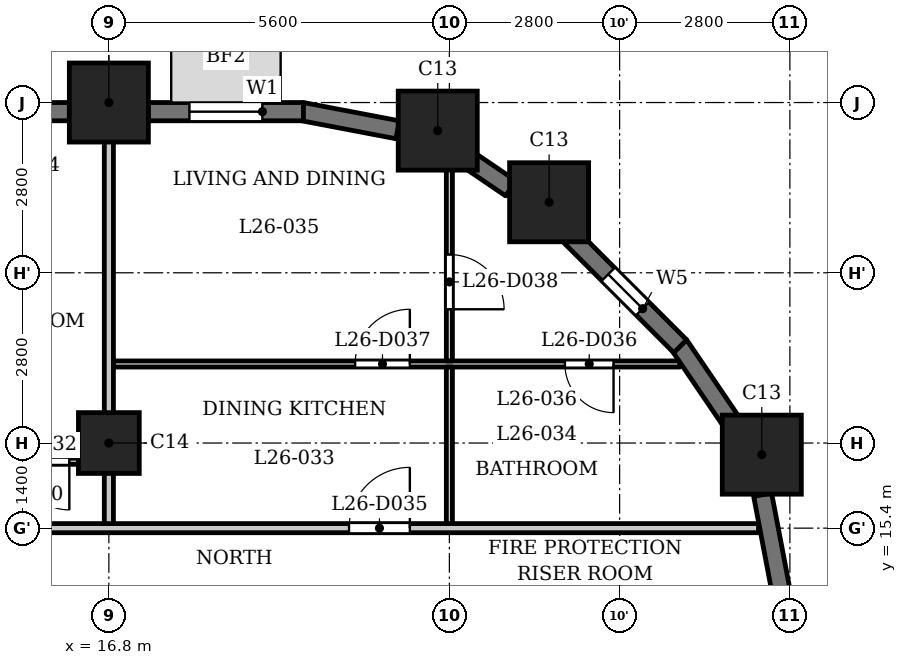
"""IFC4 building model, lengths in metres.
Left out: names, types, materials, properties, quantities, classifications, styles, units other than length and angle.
Written with IfcOpenShell. Run it as: python <this file> out.ifc"""

import sys

from ifc_helpers import new_model, si_unit, direction, frame, frame_2d, origin, origin_2d, place, context, subcontext, project, spatial, rectangle, extrude, element, fill, save


model = new_model("IFC4")
c1 = context("Model", 3, precision=1e-05, world=origin(), true_north=direction((0.0, 1.0)))
c2 = subcontext(c1, "Body", "Model", "MODEL_VIEW")
j1 = project(units=[si_unit("LENGTHUNIT", "METRE"), si_unit("PLANEANGLEUNIT", "RADIAN")], contexts=[c1])
p1 = place(None, origin())
s1 = spatial("IfcSite", under=j1, at=p1, CompositionType="ELEMENT")
p2 = place(p1, origin())
s2 = spatial("IfcBuilding", under=s1, at=p2, CompositionType="ELEMENT")
p3 = place(p2, frame((0.0, 0.0, 104.3)))
s3 = spatial("IfcBuildingStorey", under=s2, at=p3, CompositionType="ELEMENT", Elevation=104.3)
for number, where, z_axis, x_axis in (
    (1, (27.538, 16.609, 0.0), (0.0, 0.0, 1.0), (1.0, 0.0, 0.0)),
    (2, (24.04, 20.76, 0.0), (0.0, 0.0, 1.0), (1.0, 0.0, 0.0)),
    (3, (22.209, 21.938, 0.0), (0.0, 0.0, 1.0), (1.0, 0.0, 0.0)),
    (4, (16.8, 22.4, 0.0), (0.0, 0.0, 1.0), (1.0, 0.0, 0.0)),
):
    element("IfcColumn", number, at=place(p3, frame(where, z_axis=z_axis, x_axis=x_axis)), inside=s3, PredefinedType="COLUMN", context=c2, shape_type="SweptSolid", body=[
        extrude(rectangle(XDim=1.3, YDim=1.3, at=origin_2d()), origin(), (0.0, 0.0, 1.0), 3.5),
    ])
p4 = place(p3, frame((16.8, 16.8, 0.0), z_axis=(0.0, 0.0, 1.0), x_axis=(1.0, 0.0, 0.0)))
e5 = element("IfcColumn", 5, at=p4, inside=s3, PredefinedType="COLUMN", context=c2, shape_type="SweptSolid", body=[
    extrude(rectangle(XDim=1.0, YDim=1.0, at=origin_2d()), origin(), (0.0, 0.0, 1.0), 3.5),
])
for number, where, z_axis, x_axis in (
    (6, (27.853, 14.372, 0.0), (0.0, 0.0, 1.0), (-0.187, 0.982, 0.0)),
    (7, (27.082, 17.084, 0.0), (0.0, 0.0, 1.0), (-0.562, 0.827, 0.0)),
):
    element("IfcWall", number, at=place(p3, frame(where, z_axis=z_axis, x_axis=x_axis)), inside=s3, PredefinedType="SOLIDWALL", context=c2, shape_type="SweptSolid", body=[
        extrude(rectangle(XDim=1.606, YDim=0.3, at=frame_2d((0.803, 0.0))), origin(), (0.0, 0.0, 1.0), 2.4),
    ])
p5 = place(p3, frame((26.197, 18.391, 0.0), z_axis=(0.0, 0.0, 1.0), x_axis=(-0.707058908279, 0.707154650853, 0.0)))
e8 = element("IfcWall", 8, at=p5, inside=s3, PredefinedType="SOLIDWALL", context=c2, shape_type="SweptSolid", body=[
    extrude(rectangle(XDim=2.55, YDim=0.3, at=frame_2d((1.275, 0.0))), origin(), (0.0, 0.0, 1.0), 2.4),
])
p6 = place(p5, frame((0.875, 0.0, 0.6)))
e9 = element("IfcOpeningElement", 9, at=p6, cuts=e8, PredefinedType="OPENING", context=c2, shape_type="SweptSolid", body=[
    extrude(rectangle(XDim=0.8, YDim=1.55, at=frame_2d((0.4, 0.775))), frame((0.0, 0.16, 0.0), z_axis=(0.0, -1.0, 0.0), x_axis=(1.0, 0.0, 0.0)), (0.0, 0.0, 1.0), 0.32),
])
p7 = place(p3, frame((23.41, 20.989, 0.0), z_axis=(0.0, 0.0, 1.0), x_axis=(-0.827050703543, 0.562127328787, 0.0)))
e10 = element("IfcWall", 10, at=p7, inside=s3, PredefinedType="SOLIDWALL", context=c2, shape_type="SweptSolid", body=[
    extrude(rectangle(XDim=0.877, YDim=0.3, at=frame_2d((0.438, 0.0))), origin(), (0.0, 0.0, 1.0), 3.2),
])
p8 = place(p3, frame((21.55, 21.952, 0.0), z_axis=(0.0, 0.0, 1.0), x_axis=(-0.982278644094, 0.187426426519, 0.0)))
e11 = element("IfcWall", 11, at=p8, inside=s3, PredefinedType="SOLIDWALL", context=c2, shape_type="SweptSolid", body=[
    extrude(rectangle(XDim=1.606, YDim=0.3, at=frame_2d((0.803, 0.0))), origin(), (0.0, 0.0, 1.0), 2.4),
])
p9 = place(p3, frame((20.0, 22.25, 0.0), z_axis=(0.0, 0.0, 1.0), x_axis=(-1.0, 0.0, 0.0)))
e12 = element("IfcWall", 12, at=p9, inside=s3, PredefinedType="SOLIDWALL", context=c2, shape_type="SweptSolid", body=[
    extrude(rectangle(XDim=2.55, YDim=0.3, at=frame_2d((1.275, 0.0))), origin(), (0.0, 0.0, 1.0), 2.4),
])
p10 = place(p9, frame((0.675, 0.0, 0.6)))
e13 = element("IfcOpeningElement", 13, at=p10, cuts=e12, PredefinedType="OPENING", context=c2, shape_type="SweptSolid", body=[
    extrude(rectangle(XDim=1.2, YDim=1.55, at=frame_2d((0.6, 0.775))), frame((0.0, 0.16, 0.0), z_axis=(0.0, -1.0, 0.0), x_axis=(1.0, 0.0, 0.0)), (0.0, 0.0, 1.0), 0.32),
])
p11 = place(p3, frame((16.15, 22.25, 0.0), z_axis=(0.0, 0.0, 1.0), x_axis=(-1.0, 0.0, 0.0)))
e14 = element("IfcWall", 14, at=p11, inside=s3, PredefinedType="SOLIDWALL", context=c2, shape_type="SweptSolid", body=[
    extrude(rectangle(XDim=4.3, YDim=0.3, at=frame_2d((2.15, 0.0))), origin(), (0.0, 0.0, 1.0), 2.4),
])
p12 = place(p11, frame((0.337, 0.0, 0.6)))
e15 = element("IfcOpeningElement", 15, at=p12, cuts=e14, PredefinedType="OPENING", context=c2, shape_type="SweptSolid", body=[
    extrude(rectangle(XDim=1.2, YDim=1.55, at=frame_2d((0.6, 0.775))), frame((0.0, 0.16, 0.0), z_axis=(0.0, -1.0, 0.0), x_axis=(1.0, 0.0, 0.0)), (0.0, 0.0, 1.0), 0.32),
])
p13 = place(p11, frame((2.562, 0.0, 0.6)))
e16 = element("IfcOpeningElement", 16, at=p13, cuts=e14, PredefinedType="OPENING", context=c2, shape_type="SweptSolid", body=[
    extrude(rectangle(XDim=1.2, YDim=1.55, at=frame_2d((0.6, 0.775))), frame((0.0, 0.16, 0.0), z_axis=(0.0, -1.0, 0.0), x_axis=(1.0, 0.0, 0.0)), (0.0, 0.0, 1.0), 0.32),
])
p14 = place(p3, frame((14.925, 15.4, 0.0), z_axis=(0.0, 0.0, 1.0), x_axis=(1.0, 0.0, 0.0)))
e17 = element("IfcWall", 17, at=p14, inside=s3, PredefinedType="PARTITIONING", context=c2, shape_type="SweptSolid", body=[
    extrude(rectangle(XDim=12.559, YDim=0.15, at=frame_2d((6.279, 0.0))), origin(), (0.0, 0.0, 1.0), 3.2),
])
p15 = place(p14, frame((5.825, 0.0, 0.0)))
e18 = element("IfcOpeningElement", 18, at=p15, cuts=e17, PredefinedType="OPENING", context=c2, shape_type="SweptSolid", body=[
    extrude(rectangle(XDim=1.0, YDim=2.1, at=frame_2d((0.5, 1.05))), frame((0.0, 0.085, 0.0), z_axis=(0.0, -1.0, 0.0), x_axis=(1.0, 0.0, 0.0)), (0.0, 0.0, 1.0), 0.17),
])
p16 = place(p3, frame((-16.725, 16.5, 0.0), z_axis=(0.0, 0.0, 1.0), x_axis=(1.0, 0.0, 0.0)))
e19 = element("IfcWall", 19, at=p16, inside=s3, PredefinedType="PARTITIONING", context=c2, shape_type="SweptSolid", body=[
    extrude(rectangle(XDim=33.45, YDim=0.1, at=frame_2d((16.725, 0.0))), origin(), (0.0, 0.0, 1.0), 3.2),
])
p17 = place(p16, frame((1.075, 0.0, 0.0)))
e20 = element("IfcOpeningElement", 20, at=p17, cuts=e19, PredefinedType="OPENING", context=c2, shape_type="SweptSolid", body=[
    extrude(rectangle(XDim=0.8, YDim=2.1, at=frame_2d((0.4, 1.05))), frame((0.0, 0.06, 0.0), z_axis=(0.0, -1.0, 0.0), x_axis=(1.0, 0.0, 0.0)), (0.0, 0.0, 1.0), 0.12),
])
p18 = place(p16, frame((3.975, 0.0, 0.0)))
e21 = element("IfcOpeningElement", 21, at=p18, cuts=e19, PredefinedType="OPENING", context=c2, shape_type="SweptSolid", body=[
    extrude(rectangle(XDim=0.9, YDim=2.1, at=frame_2d((0.45, 1.05))), frame((0.0, 0.06, 0.0), z_axis=(0.0, -1.0, 0.0), x_axis=(1.0, 0.0, 0.0)), (0.0, 0.0, 1.0), 0.12),
])
p19 = place(p16, frame((8.975, 0.0, 0.0)))
e22 = element("IfcOpeningElement", 22, at=p19, cuts=e19, PredefinedType="OPENING", context=c2, shape_type="SweptSolid", body=[
    extrude(rectangle(XDim=0.8, YDim=2.1, at=frame_2d((0.4, 1.05))), frame((0.0, 0.06, 0.0), z_axis=(0.0, -1.0, 0.0), x_axis=(1.0, 0.0, 0.0)), (0.0, 0.0, 1.0), 0.12),
])
p20 = place(p16, frame((6.325, 0.0, 0.0)))
e23 = element("IfcOpeningElement", 23, at=p20, cuts=e19, PredefinedType="OPENING", context=c2, shape_type="SweptSolid", body=[
    extrude(rectangle(XDim=0.9, YDim=2.1, at=frame_2d((0.45, 1.05))), frame((0.0, 0.06, 0.0), z_axis=(0.0, -1.0, 0.0), x_axis=(1.0, 0.0, 0.0)), (0.0, 0.0, 1.0), 0.12),
])
p21 = place(p16, frame((20.725, 0.0, 0.0)))
e24 = element("IfcOpeningElement", 24, at=p21, cuts=e19, PredefinedType="OPENING", context=c2, shape_type="SweptSolid", body=[
    extrude(rectangle(XDim=0.8, YDim=2.1, at=frame_2d((0.4, 1.05))), frame((0.0, 0.06, 0.0), z_axis=(0.0, -1.0, 0.0), x_axis=(1.0, 0.0, 0.0)), (0.0, 0.0, 1.0), 0.12),
])
p22 = place(p16, frame((17.775, 0.0, 0.0)))
e25 = element("IfcOpeningElement", 25, at=p22, cuts=e19, PredefinedType="OPENING", context=c2, shape_type="SweptSolid", body=[
    extrude(rectangle(XDim=0.9, YDim=2.1, at=frame_2d((0.45, 1.05))), frame((0.0, 0.06, 0.0), z_axis=(0.0, -1.0, 0.0), x_axis=(1.0, 0.0, 0.0)), (0.0, 0.0, 1.0), 0.12),
])
p23 = place(p16, frame((11.825, 0.0, 0.0)))
e26 = element("IfcOpeningElement", 26, at=p23, cuts=e19, PredefinedType="OPENING", context=c2, shape_type="SweptSolid", body=[
    extrude(rectangle(XDim=0.9, YDim=2.1, at=frame_2d((0.45, 1.05))), frame((0.0, 0.06, 0.0), z_axis=(0.0, -1.0, 0.0), x_axis=(1.0, 0.0, 0.0)), (0.0, 0.0, 1.0), 0.12),
])
p24 = place(p16, frame((15.175, 0.0, 0.0)))
e27 = element("IfcOpeningElement", 27, at=p24, cuts=e19, PredefinedType="OPENING", context=c2, shape_type="SweptSolid", body=[
    extrude(rectangle(XDim=0.9, YDim=2.1, at=frame_2d((0.45, 1.05))), frame((0.0, 0.06, 0.0), z_axis=(0.0, -1.0, 0.0), x_axis=(1.0, 0.0, 0.0)), (0.0, 0.0, 1.0), 0.12),
])
p25 = place(p16, frame((22.975, 0.0, 0.0)))
e28 = element("IfcOpeningElement", 28, at=p25, cuts=e19, PredefinedType="OPENING", context=c2, shape_type="SweptSolid", body=[
    extrude(rectangle(XDim=0.8, YDim=2.1, at=frame_2d((0.4, 1.05))), frame((0.0, 0.06, 0.0), z_axis=(0.0, -1.0, 0.0), x_axis=(1.0, 0.0, 0.0)), (0.0, 0.0, 1.0), 0.12),
])
p26 = place(p16, frame((24.875, 0.0, 0.0)))
e29 = element("IfcOpeningElement", 29, at=p26, cuts=e19, PredefinedType="OPENING", context=c2, shape_type="SweptSolid", body=[
    extrude(rectangle(XDim=0.9, YDim=2.1, at=frame_2d((0.45, 1.05))), frame((0.0, 0.06, 0.0), z_axis=(0.0, -1.0, 0.0), x_axis=(1.0, 0.0, 0.0)), (0.0, 0.0, 1.0), 0.12),
])
p27 = place(p16, frame((32.075, 0.0, 0.0)))
e30 = element("IfcOpeningElement", 30, at=p27, cuts=e19, PredefinedType="OPENING", context=c2, shape_type="SweptSolid", body=[
    extrude(rectangle(XDim=0.8, YDim=2.1, at=frame_2d((0.4, 1.05))), frame((0.0, 0.06, 0.0), z_axis=(0.0, -1.0, 0.0), x_axis=(1.0, 0.0, 0.0)), (0.0, 0.0, 1.0), 0.12),
])
p28 = place(p16, frame((29.175, 0.0, 0.0)))
e31 = element("IfcOpeningElement", 31, at=p28, cuts=e19, PredefinedType="OPENING", context=c2, shape_type="SweptSolid", body=[
    extrude(rectangle(XDim=0.9, YDim=2.1, at=frame_2d((0.45, 1.05))), frame((0.0, 0.06, 0.0), z_axis=(0.0, -1.0, 0.0), x_axis=(1.0, 0.0, 0.0)), (0.0, 0.0, 1.0), 0.12),
])
p29 = place(p3, frame((16.875, 18.1, 0.0), z_axis=(0.0, 0.0, 1.0), x_axis=(1.0, 0.0, 0.0)))
e32 = element("IfcWall", 32, at=p29, inside=s3, PredefinedType="PARTITIONING", context=c2, shape_type="SweptSolid", body=[
    extrude(rectangle(XDim=9.315, YDim=0.1, at=frame_2d((4.658, 0.0))), origin(), (0.0, 0.0, 1.0), 3.2),
])
p30 = place(p29, frame((7.425, 0.0, 0.0)))
e33 = element("IfcOpeningElement", 33, at=p30, cuts=e32, PredefinedType="OPENING", context=c2, shape_type="SweptSolid", body=[
    extrude(rectangle(XDim=0.8, YDim=2.1, at=frame_2d((0.4, 1.05))), frame((0.0, 0.06, 0.0), z_axis=(0.0, -1.0, 0.0), x_axis=(1.0, 0.0, 0.0)), (0.0, 0.0, 1.0), 0.12),
])
p31 = place(p29, frame((3.975, 0.0, 0.0)))
e34 = element("IfcOpeningElement", 34, at=p31, cuts=e32, PredefinedType="OPENING", context=c2, shape_type="SweptSolid", body=[
    extrude(rectangle(XDim=0.9, YDim=2.1, at=frame_2d((0.45, 1.05))), frame((0.0, 0.06, 0.0), z_axis=(0.0, -1.0, 0.0), x_axis=(1.0, 0.0, 0.0)), (0.0, 0.0, 1.0), 0.12),
])
p32 = place(p3, frame((16.8, 15.475, 0.0), z_axis=(0.0, 0.0, 1.0), x_axis=(0.0, 1.0, 0.0)))
e35 = element("IfcWall", 35, at=p32, inside=s3, PredefinedType="PARTITIONING", context=c2, shape_type="SweptSolid", body=[
    extrude(rectangle(XDim=7.555, YDim=0.15, at=frame_2d((3.777, 0.0))), origin(), (0.0, 0.0, 1.0), 3.2),
])
p33 = place(p3, frame((22.4, 15.475, 0.0), z_axis=(0.0, 0.0, 1.0), x_axis=(0.0, 1.0, 0.0)))
e36 = element("IfcWall", 36, at=p33, inside=s3, PredefinedType="PARTITIONING", context=c2, shape_type="SweptSolid", body=[
    extrude(rectangle(XDim=2.575, YDim=0.1, at=frame_2d((1.288, 0.0))), origin(), (0.0, 0.0, 1.0), 3.2),
])
p34 = place(p3, frame((22.4, 18.15, 0.0), z_axis=(0.0, 0.0, 1.0), x_axis=(0.0, 1.0, 0.0)))
e37 = element("IfcWall", 37, at=p34, inside=s3, PredefinedType="PARTITIONING", context=c2, shape_type="SweptSolid", body=[
    extrude(rectangle(XDim=3.57, YDim=0.1, at=frame_2d((1.785, 0.0))), origin(), (0.0, 0.0, 1.0), 3.2),
])
p35 = place(p34, frame((0.85, 0.0, 0.0)))
e38 = element("IfcOpeningElement", 38, at=p35, cuts=e37, PredefinedType="OPENING", context=c2, shape_type="SweptSolid", body=[
    extrude(rectangle(XDim=0.9, YDim=2.1, at=frame_2d((0.45, 1.05))), frame((0.0, 0.06, 0.0), z_axis=(0.0, -1.0, 0.0), x_axis=(1.0, 0.0, 0.0)), (0.0, 0.0, 1.0), 0.12),
])
p36 = place(p27, origin())
e39 = element("IfcDoor", 39, at=p36, inside=s3, OperationType="SINGLE_SWING_RIGHT", PredefinedType="DOOR", context=c2, shape_type="SweptSolid", body=[
    extrude(rectangle(XDim=0.8, YDim=2.1, at=frame_2d((0.4, 1.05))), frame((0.0, 0.025, 0.0), z_axis=(0.0, -1.0, 0.0), x_axis=(1.0, 0.0, 0.0)), (0.0, 0.0, 1.0), 0.05),
])
fill(e30, e39)
p37 = place(p15, origin())
e40 = element("IfcDoor", 40, at=p37, inside=s3, OperationType="SINGLE_SWING_LEFT", PredefinedType="DOOR", context=c2, shape_type="SweptSolid", body=[
    extrude(rectangle(XDim=1.0, YDim=2.1, at=frame_2d((0.5, 1.05))), frame((0.0, 0.025, 0.0), z_axis=(0.0, -1.0, 0.0), x_axis=(1.0, 0.0, 0.0)), (0.0, 0.0, 1.0), 0.05),
])
fill(e18, e40)
p38 = place(p30, origin())
e41 = element("IfcDoor", 41, at=p38, inside=s3, OperationType="SINGLE_SWING_RIGHT", PredefinedType="DOOR", context=c2, shape_type="SweptSolid", body=[
    extrude(rectangle(XDim=0.8, YDim=2.1, at=frame_2d((0.4, 1.05))), frame((0.0, 0.025, 0.0), z_axis=(0.0, -1.0, 0.0), x_axis=(1.0, 0.0, 0.0)), (0.0, 0.0, 1.0), 0.05),
])
fill(e33, e41)
p39 = place(p31, origin())
e42 = element("IfcDoor", 42, at=p39, inside=s3, OperationType="SINGLE_SWING_LEFT", PredefinedType="DOOR", context=c2, shape_type="SweptSolid", body=[
    extrude(rectangle(XDim=0.9, YDim=2.1, at=frame_2d((0.45, 1.05))), frame((0.0, 0.025, 0.0), z_axis=(0.0, -1.0, 0.0), x_axis=(1.0, 0.0, 0.0)), (0.0, 0.0, 1.0), 0.05),
])
fill(e34, e42)
p40 = place(p35, origin())
e43 = element("IfcDoor", 43, at=p40, inside=s3, OperationType="SINGLE_SWING_LEFT", PredefinedType="DOOR", context=c2, shape_type="SweptSolid", body=[
    extrude(rectangle(XDim=0.9, YDim=2.1, at=frame_2d((0.45, 1.05))), frame((0.0, 0.025, 0.0), z_axis=(0.0, -1.0, 0.0), x_axis=(1.0, 0.0, 0.0)), (0.0, 0.0, 1.0), 0.05),
])
fill(e38, e43)
p41 = place(p6, origin())
e44 = element("IfcWindow", 44, at=p41, inside=s3, PartitioningType="SINGLE_PANEL", PredefinedType="WINDOW", context=c2, shape_type="SweptSolid", body=[
    extrude(rectangle(XDim=0.8, YDim=1.55, at=frame_2d((0.4, 0.775))), frame((0.0, 0.03, 0.0), z_axis=(0.0, -1.0, 0.0), x_axis=(1.0, 0.0, 0.0)), (0.0, 0.0, 1.0), 0.06),
])
fill(e9, e44)
p42 = place(p10, origin())
e45 = element("IfcWindow", 45, at=p42, inside=s3, PartitioningType="SINGLE_PANEL", PredefinedType="WINDOW", context=c2, shape_type="SweptSolid", body=[
    extrude(rectangle(XDim=1.2, YDim=1.55, at=frame_2d((0.6, 0.775))), frame((0.0, 0.03, 0.0), z_axis=(0.0, -1.0, 0.0), x_axis=(1.0, 0.0, 0.0)), (0.0, 0.0, 1.0), 0.06),
])
fill(e13, e45)
save(model, sys.argv[1])
